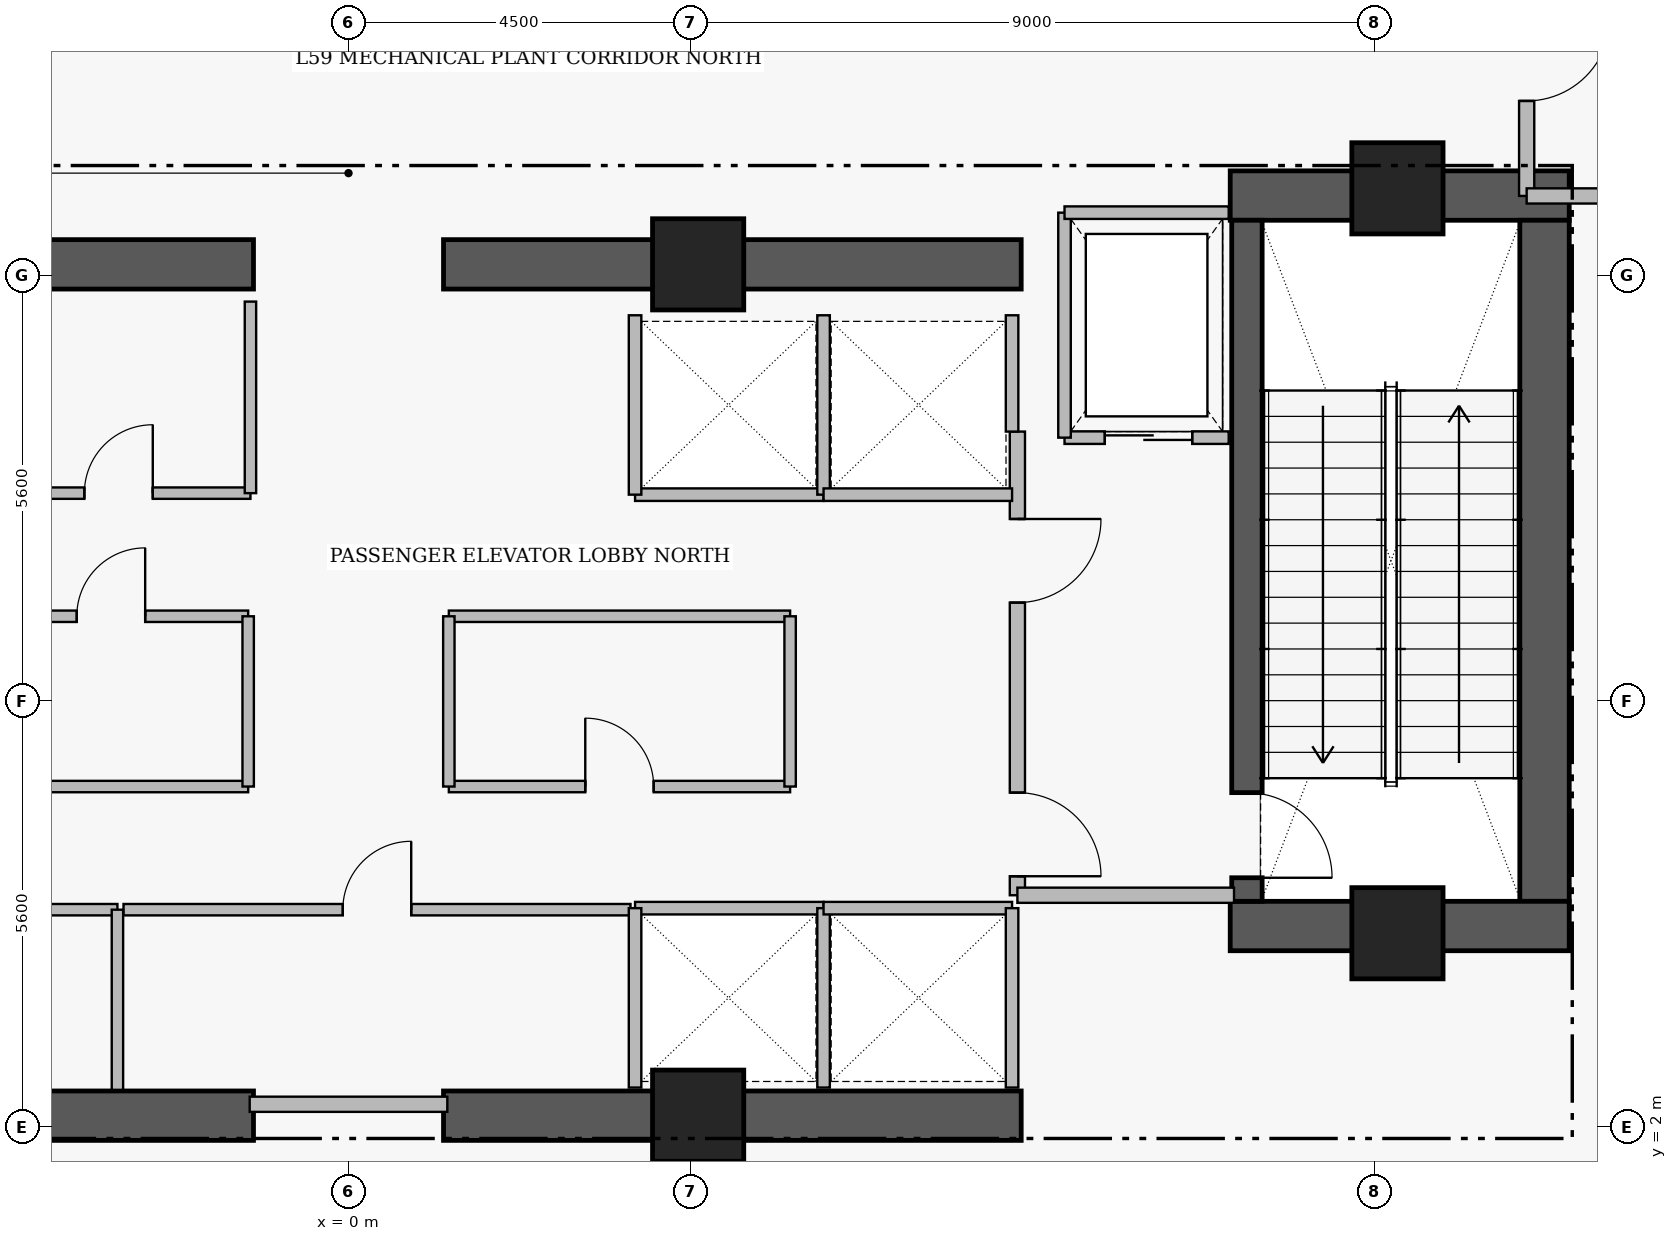
"""IFC4 building model, lengths in metres.
Left out: names, types, materials, properties, quantities, classifications, styles, units other than length and angle.
Written with IfcOpenShell. Run it as: python <this file> out.ifc"""

import sys

from ifc_helpers import new_model, si_unit, direction, frame, frame_2d, origin, origin_2d, place, context, subcontext, project, spatial, rectangle, extrude, element, fill, save


model = new_model("IFC4")
c1 = context("Model", 3, precision=1e-05, world=origin(), true_north=direction((0.0, 1.0)))
c2 = subcontext(c1, "Body", "Model", "MODEL_VIEW")
j1 = project(units=[si_unit("LENGTHUNIT", "METRE"), si_unit("PLANEANGLEUNIT", "RADIAN")], contexts=[c1])
p1 = place(None, origin())
s1 = spatial("IfcSite", under=j1, at=p1, CompositionType="ELEMENT")
p2 = place(p1, origin())
s2 = spatial("IfcBuilding", under=s1, at=p2, CompositionType="ELEMENT")
p3 = place(p2, frame((0.0, 0.0, 233.65)))
s3 = spatial("IfcBuildingStorey", under=s2, at=p3, CompositionType="ELEMENT", Elevation=233.65)
p4 = place(p3, frame((11.6, 14.255, 0.0), z_axis=(0.0, 0.0, 1.0), x_axis=(1.0, 0.0, 0.0)))
e1 = element("IfcWall", 1, at=p4, inside=s3, PredefinedType="SHEAR", context=c2, shape_type="SweptSolid", body=[
    extrude(rectangle(XDim=4.46, YDim=0.65, at=frame_2d((2.23, 0.0))), origin(), (0.0, 0.0, 1.0), 5.81),
])
p5 = place(p3, frame((15.735, 4.97, 0.0), z_axis=(0.0, 0.0, 1.0), x_axis=(0.0, 1.0, 0.0)))
e2 = element("IfcWall", 2, at=p5, inside=s3, PredefinedType="SHEAR", context=c2, shape_type="SweptSolid", body=[
    extrude(rectangle(XDim=8.96, YDim=0.65, at=frame_2d((4.48, 0.0))), origin(), (0.0, 0.0, 1.0), 5.81),
])
p6 = place(p3, frame((11.6, 4.645, 0.0), z_axis=(0.0, 0.0, 1.0), x_axis=(1.0, 0.0, 0.0)))
e3 = element("IfcWall", 3, at=p6, inside=s3, PredefinedType="SHEAR", context=c2, shape_type="SweptSolid", body=[
    extrude(rectangle(XDim=4.46, YDim=0.65, at=frame_2d((2.23, 0.0))), origin(), (0.0, 0.0, 1.0), 5.81),
])
for number, where, z_axis, x_axis in (
    (4, (-8.85, 2.15, 0.0), (0.0, 0.0, 1.0), (1.0, 0.0, 0.0)),
    (5, (1.25, 2.15, 0.0), (0.0, 0.0, 1.0), (1.0, 0.0, 0.0)),
    (6, (-8.85, 13.35, 0.0), (0.0, 0.0, 1.0), (1.0, 0.0, 0.0)),
    (7, (1.25, 13.35, 0.0), (0.0, 0.0, 1.0), (1.0, 0.0, 0.0)),
):
    element("IfcWall", number, at=place(p3, frame(where, z_axis=z_axis, x_axis=x_axis)), inside=s3, PredefinedType="SHEAR", context=c2, shape_type="SweptSolid", body=[
        extrude(rectangle(XDim=7.6, YDim=0.65, at=frame_2d((3.8, 0.0))), origin(), (0.0, 0.0, 1.0), 5.74),
    ])
p7 = place(p3, frame((11.82, 13.93, 0.0), z_axis=(0.0, 0.0, 1.0), x_axis=(0.0, -1.0, 0.0)))
e8 = element("IfcWall", 8, at=p7, inside=s3, PredefinedType="SHEAR", context=c2, shape_type="SweptSolid", body=[
    extrude(rectangle(XDim=8.96, YDim=0.4, at=frame_2d((4.48, 0.0))), origin(), (0.0, 0.0, 1.0), 5.81),
])
p8 = place(p7, frame((7.53, 0.0, 0.0)))
e9 = element("IfcOpeningElement", 9, at=p8, cuts=e8, PredefinedType="OPENING", context=c2, shape_type="SweptSolid", body=[
    extrude(rectangle(XDim=1.12, YDim=2.22, at=frame_2d((0.56, 1.11))), frame((0.0, 0.21, 0.0), z_axis=(0.0, -1.0, 0.0), x_axis=(1.0, 0.0, 0.0)), (0.0, 0.0, 1.0), 0.42),
])
for number, where, z_axis, x_axis in (
    (10, (4.6, 13.35, 0.0), (0.0, 0.0, 1.0), (1.0, 0.0, 0.0)),
    (11, (13.8, 14.35, 0.0), (0.0, 0.0, 1.0), (1.0, 0.0, 0.0)),
    (12, (4.6, 2.15, 0.0), (0.0, 0.0, 1.0), (1.0, 0.0, 0.0)),
    (13, (13.8, 4.55, 0.0), (0.0, 0.0, 1.0), (1.0, 0.0, 0.0)),
):
    element("IfcColumn", number, at=place(p3, frame(where, z_axis=z_axis, x_axis=x_axis)), inside=s3, PredefinedType="COLUMN", context=c2, shape_type="SweptSolid", body=[
        extrude(rectangle(XDim=1.2, YDim=1.2, at=origin_2d()), origin(), (0.0, 0.0, 1.0), 6.0),
    ])
p9 = place(p3, frame((8.8, 11.15, 0.0), z_axis=(0.0, 0.0, 1.0), x_axis=(0.0, -1.0, 0.0)))
e14 = element("IfcWall", 14, at=p9, inside=s3, PredefinedType="PARTITIONING", context=c2, shape_type="SweptSolid", body=[
    extrude(rectangle(XDim=6.1, YDim=0.2, at=frame_2d((3.05, 0.0))), origin(), (0.0, 0.0, 1.0), 5.74),
])
p10 = place(p9, frame((1.15, 0.0, 0.0)))
e15 = element("IfcOpeningElement", 15, at=p10, cuts=e14, PredefinedType="OPENING", context=c2, shape_type="SweptSolid", body=[
    extrude(rectangle(XDim=1.1, YDim=2.2, at=frame_2d((0.55, 1.1))), frame((0.0, 0.11, 0.0), z_axis=(0.0, -1.0, 0.0), x_axis=(1.0, 0.0, 0.0)), (0.0, 0.0, 1.0), 0.22),
])
p11 = place(p9, frame((4.75, 0.0, 0.0)))
e16 = element("IfcOpeningElement", 16, at=p11, cuts=e14, PredefinedType="OPENING", context=c2, shape_type="SweptSolid", body=[
    extrude(rectangle(XDim=1.1, YDim=2.2, at=frame_2d((0.55, 1.1))), frame((0.0, 0.11, 0.0), z_axis=(0.0, -1.0, 0.0), x_axis=(1.0, 0.0, 0.0)), (0.0, 0.0, 1.0), 0.22),
])
p12 = place(p3, frame((9.42, 11.07, 0.0), z_axis=(0.0, 0.0, 1.0), x_axis=(1.0, 0.0, 0.0)))
e17 = element("IfcWall", 17, at=p12, inside=s3, PredefinedType="PARTITIONING", context=c2, shape_type="SweptSolid", body=[
    extrude(rectangle(XDim=2.16, YDim=0.165, at=frame_2d((1.08, 0.0))), origin(), (0.0, 0.0, 1.0), 5.74),
])
p13 = place(p12, frame((0.53, 0.0, 0.0)))
e18 = element("IfcOpeningElement", 18, at=p13, cuts=e17, PredefinedType="OPENING", context=c2, shape_type="SweptSolid", body=[
    extrude(rectangle(XDim=1.15, YDim=2.25, at=frame_2d((0.575, 1.125))), frame((0.0, 0.093, 0.0), z_axis=(0.0, -1.0, 0.0), x_axis=(1.0, 0.0, 0.0)), (0.0, 0.0, 1.0), 0.185),
])
p14 = place(p3, frame((-8.71, 4.86, 0.0), z_axis=(0.0, 0.0, 1.0), x_axis=(1.0, 0.0, 0.0)))
e19 = element("IfcWall", 19, at=p14, inside=s3, PredefinedType="PARTITIONING", context=c2, shape_type="SweptSolid", body=[
    extrude(rectangle(XDim=5.67, YDim=0.15, at=frame_2d((2.835, 0.0))), origin(), (0.0, 0.0, 1.0), 5.74),
])
p15 = place(p14, frame((2.385, 0.0, 0.0)))
e20 = element("IfcOpeningElement", 20, at=p15, cuts=e19, PredefinedType="OPENING", context=c2, shape_type="SweptSolid", body=[
    extrude(rectangle(XDim=0.9, YDim=2.15, at=frame_2d((0.45, 1.075))), frame((0.0, 0.085, 0.0), z_axis=(0.0, -1.0, 0.0), x_axis=(1.0, 0.0, 0.0)), (0.0, 0.0, 1.0), 0.17),
])
p16 = place(p3, frame((-2.96, 4.86, 0.0), z_axis=(0.0, 0.0, 1.0), x_axis=(1.0, 0.0, 0.0)))
e21 = element("IfcWall", 21, at=p16, inside=s3, PredefinedType="PARTITIONING", context=c2, shape_type="SweptSolid", body=[
    extrude(rectangle(XDim=6.67, YDim=0.15, at=frame_2d((3.335, 0.0))), origin(), (0.0, 0.0, 1.0), 5.74),
])
p17 = place(p16, frame((2.885, 0.0, 0.0)))
e22 = element("IfcOpeningElement", 22, at=p17, cuts=e21, PredefinedType="OPENING", context=c2, shape_type="SweptSolid", body=[
    extrude(rectangle(XDim=0.9, YDim=2.15, at=frame_2d((0.45, 1.075))), frame((0.0, 0.085, 0.0), z_axis=(0.0, -1.0, 0.0), x_axis=(1.0, 0.0, 0.0)), (0.0, 0.0, 1.0), 0.17),
])
p18 = place(p3, frame((-4.76, 10.34, 0.0), z_axis=(0.0, 0.0, 1.0), x_axis=(1.0, 0.0, 0.0)))
e23 = element("IfcWall", 23, at=p18, inside=s3, PredefinedType="PARTITIONING", context=c2, shape_type="SweptSolid", body=[
    extrude(rectangle(XDim=3.47, YDim=0.15, at=frame_2d((1.735, 0.0))), origin(), (0.0, 0.0, 1.0), 5.74),
])
p19 = place(p18, frame((1.285, 0.0, 0.0)))
e24 = element("IfcOpeningElement", 24, at=p19, cuts=e23, PredefinedType="OPENING", context=c2, shape_type="SweptSolid", body=[
    extrude(rectangle(XDim=0.9, YDim=2.15, at=frame_2d((0.45, 1.075))), frame((0.0, 0.085, 0.0), z_axis=(0.0, -1.0, 0.0), x_axis=(1.0, 0.0, 0.0)), (0.0, 0.0, 1.0), 0.17),
])
p20 = place(p3, frame((-4.93, 8.72, 0.0), z_axis=(0.0, 0.0, 1.0), x_axis=(1.0, 0.0, 0.0)))
e25 = element("IfcWall", 25, at=p20, inside=s3, PredefinedType="PARTITIONING", context=c2, shape_type="SweptSolid", body=[
    extrude(rectangle(XDim=3.61, YDim=0.15, at=frame_2d((1.805, 0.0))), origin(), (0.0, 0.0, 1.0), 5.74),
])
p21 = place(p20, frame((1.355, 0.0, 0.0)))
e26 = element("IfcOpeningElement", 26, at=p21, cuts=e25, PredefinedType="OPENING", context=c2, shape_type="SweptSolid", body=[
    extrude(rectangle(XDim=0.9, YDim=2.15, at=frame_2d((0.45, 1.075))), frame((0.0, 0.085, 0.0), z_axis=(0.0, -1.0, 0.0), x_axis=(1.0, 0.0, 0.0)), (0.0, 0.0, 1.0), 0.17),
])
p22 = place(p3, frame((1.32, 6.48, 0.0), z_axis=(0.0, 0.0, 1.0), x_axis=(1.0, 0.0, 0.0)))
e27 = element("IfcWall", 27, at=p22, inside=s3, PredefinedType="PARTITIONING", context=c2, shape_type="SweptSolid", body=[
    extrude(rectangle(XDim=4.49, YDim=0.15, at=frame_2d((2.245, 0.0))), origin(), (0.0, 0.0, 1.0), 5.74),
])
p23 = place(p22, frame((1.795, 0.0, 0.0)))
e28 = element("IfcOpeningElement", 28, at=p23, cuts=e27, PredefinedType="OPENING", context=c2, shape_type="SweptSolid", body=[
    extrude(rectangle(XDim=0.9, YDim=2.15, at=frame_2d((0.45, 1.075))), frame((0.0, 0.085, 0.0), z_axis=(0.0, -1.0, 0.0), x_axis=(1.0, 0.0, 0.0)), (0.0, 0.0, 1.0), 0.17),
])
p24 = place(p3, frame((15.5, 19.3, 0.0), z_axis=(0.0, 0.0, 1.0), x_axis=(0.0, -1.0, 0.0)))
e29 = element("IfcWall", 29, at=p24, inside=s3, PredefinedType="PARTITIONING", context=c2, shape_type="SweptSolid", body=[
    extrude(rectangle(XDim=5.05, YDim=0.2, at=frame_2d((2.525, 0.0))), origin(), (0.0, 0.0, 1.0), 5.74),
])
p25 = place(p24, frame((2.7, 0.0, 0.0)))
e30 = element("IfcOpeningElement", 30, at=p25, cuts=e29, PredefinedType="OPENING", context=c2, shape_type="SweptSolid", body=[
    extrude(rectangle(XDim=1.1, YDim=2.2, at=frame_2d((0.55, 1.1))), frame((0.0, 0.11, 0.0), z_axis=(0.0, -1.0, 0.0), x_axis=(1.0, 0.0, 0.0)), (0.0, 0.0, 1.0), 0.22),
])
p26 = place(p3, frame((8.8, 5.05, 0.0), z_axis=(0.0, 0.0, 1.0), x_axis=(1.0, 0.0, 0.0)))
e31 = element("IfcWall", 31, at=p26, inside=s3, PredefinedType="PARTITIONING", context=c2, shape_type="SweptSolid", body=[
    extrude(rectangle(XDim=2.85, YDim=0.2, at=frame_2d((1.425, 0.0))), origin(), (0.0, 0.0, 1.0), 5.74),
])
p27 = place(p3, frame((9.42, 11.07, 0.0), z_axis=(0.0, 0.0, 1.0), x_axis=(0.0, 1.0, 0.0)))
e32 = element("IfcWall", 32, at=p27, inside=s3, PredefinedType="PARTITIONING", context=c2, shape_type="SweptSolid", body=[
    extrude(rectangle(XDim=2.96, YDim=0.165, at=frame_2d((1.48, 0.0))), origin(), (0.0, 0.0, 1.0), 5.74),
])
p28 = place(p3, frame((9.42, 14.03, 0.0), z_axis=(0.0, 0.0, 1.0), x_axis=(1.0, 0.0, 0.0)))
e33 = element("IfcWall", 33, at=p28, inside=s3, PredefinedType="PARTITIONING", context=c2, shape_type="SweptSolid", body=[
    extrude(rectangle(XDim=2.16, YDim=0.165, at=frame_2d((1.08, 0.0))), origin(), (0.0, 0.0, 1.0), 5.74),
])
p29 = place(p3, frame((3.77, 4.88, 0.0), z_axis=(0.0, 0.0, 1.0), x_axis=(1.0, 0.0, 0.0)))
e34 = element("IfcWall", 34, at=p29, inside=s3, PredefinedType="PARTITIONING", context=c2, shape_type="SweptSolid", body=[
    extrude(rectangle(XDim=2.48, YDim=0.165, at=frame_2d((1.24, 0.0))), origin(), (0.0, 0.0, 1.0), 5.74),
])
for number, where, z_axis, x_axis in (
    (35, (3.77, 2.52, 0.0), (0.0, 0.0, 1.0), (0.0, 1.0, 0.0)),
    (36, (6.25, 2.52, 0.0), (0.0, 0.0, 1.0), (0.0, 1.0, 0.0)),
):
    element("IfcWall", number, at=place(p3, frame(where, z_axis=z_axis, x_axis=x_axis)), inside=s3, PredefinedType="PARTITIONING", context=c2, shape_type="SweptSolid", body=[
        extrude(rectangle(XDim=2.36, YDim=0.165, at=frame_2d((1.18, 0.0))), origin(), (0.0, 0.0, 1.0), 5.74),
    ])
p30 = place(p3, frame((6.25, 4.88, 0.0), z_axis=(0.0, 0.0, 1.0), x_axis=(1.0, 0.0, 0.0)))
e37 = element("IfcWall", 37, at=p30, inside=s3, PredefinedType="PARTITIONING", context=c2, shape_type="SweptSolid", body=[
    extrude(rectangle(XDim=2.48, YDim=0.165, at=frame_2d((1.24, 0.0))), origin(), (0.0, 0.0, 1.0), 5.74),
])
p31 = place(p3, frame((8.73, 2.52, 0.0), z_axis=(0.0, 0.0, 1.0), x_axis=(0.0, 1.0, 0.0)))
e38 = element("IfcWall", 38, at=p31, inside=s3, PredefinedType="PARTITIONING", context=c2, shape_type="SweptSolid", body=[
    extrude(rectangle(XDim=2.36, YDim=0.165, at=frame_2d((1.18, 0.0))), origin(), (0.0, 0.0, 1.0), 5.74),
])
p32 = place(p3, frame((3.77, 10.32, 0.0), z_axis=(0.0, 0.0, 1.0), x_axis=(1.0, 0.0, 0.0)))
e39 = element("IfcWall", 39, at=p32, inside=s3, PredefinedType="PARTITIONING", context=c2, shape_type="SweptSolid", body=[
    extrude(rectangle(XDim=2.48, YDim=0.165, at=frame_2d((1.24, 0.0))), origin(), (0.0, 0.0, 1.0), 5.74),
])
for number, where, z_axis, x_axis in (
    (40, (3.77, 10.32, 0.0), (0.0, 0.0, 1.0), (0.0, 1.0, 0.0)),
    (41, (6.25, 10.32, 0.0), (0.0, 0.0, 1.0), (0.0, 1.0, 0.0)),
):
    element("IfcWall", number, at=place(p3, frame(where, z_axis=z_axis, x_axis=x_axis)), inside=s3, PredefinedType="PARTITIONING", context=c2, shape_type="SweptSolid", body=[
        extrude(rectangle(XDim=2.36, YDim=0.165, at=frame_2d((1.18, 0.0))), origin(), (0.0, 0.0, 1.0), 5.74),
    ])
p33 = place(p3, frame((6.25, 10.32, 0.0), z_axis=(0.0, 0.0, 1.0), x_axis=(1.0, 0.0, 0.0)))
e42 = element("IfcWall", 42, at=p33, inside=s3, PredefinedType="PARTITIONING", context=c2, shape_type="SweptSolid", body=[
    extrude(rectangle(XDim=2.48, YDim=0.165, at=frame_2d((1.24, 0.0))), origin(), (0.0, 0.0, 1.0), 5.74),
])
p34 = place(p3, frame((8.73, 11.15, 0.0), z_axis=(0.0, 0.0, 1.0), x_axis=(0.0, 1.0, 0.0)))
e43 = element("IfcWall", 43, at=p34, inside=s3, PredefinedType="PARTITIONING", context=c2, shape_type="SweptSolid", body=[
    extrude(rectangle(XDim=1.53, YDim=0.165, at=frame_2d((0.765, 0.0))), origin(), (0.0, 0.0, 1.0), 5.74),
])
p35 = place(p3, frame((-1.3, 2.3, 0.0), z_axis=(0.0, 0.0, 1.0), x_axis=(1.0, 0.0, 0.0)))
e44 = element("IfcWall", 44, at=p35, inside=s3, PredefinedType="PARTITIONING", context=c2, shape_type="SweptSolid", body=[
    extrude(rectangle(XDim=2.6, YDim=0.2, at=frame_2d((1.3, 0.0))), origin(), (0.0, 0.0, 1.0), 4.64),
])
p36 = place(p3, frame((-3.04, 2.49, 0.0), z_axis=(0.0, 0.0, 1.0), x_axis=(0.0, 1.0, 0.0)))
e45 = element("IfcWall", 45, at=p36, inside=s3, PredefinedType="PARTITIONING", context=c2, shape_type="SweptSolid", body=[
    extrude(rectangle(XDim=2.37, YDim=0.15, at=frame_2d((1.185, 0.0))), origin(), (0.0, 0.0, 1.0), 5.74),
])
p37 = place(p3, frame((-1.29, 10.34, 0.0), z_axis=(0.0, 0.0, 1.0), x_axis=(0.0, 1.0, 0.0)))
e46 = element("IfcWall", 46, at=p37, inside=s3, PredefinedType="PARTITIONING", context=c2, shape_type="SweptSolid", body=[
    extrude(rectangle(XDim=2.52, YDim=0.15, at=frame_2d((1.26, 0.0))), origin(), (0.0, 0.0, 1.0), 5.74),
])
p38 = place(p3, frame((-4.93, 6.48, 0.0), z_axis=(0.0, 0.0, 1.0), x_axis=(1.0, 0.0, 0.0)))
e47 = element("IfcWall", 47, at=p38, inside=s3, PredefinedType="PARTITIONING", context=c2, shape_type="SweptSolid", body=[
    extrude(rectangle(XDim=3.61, YDim=0.15, at=frame_2d((1.805, 0.0))), origin(), (0.0, 0.0, 1.0), 5.74),
])
p39 = place(p3, frame((-1.32, 6.48, 0.0), z_axis=(0.0, 0.0, 1.0), x_axis=(0.0, 1.0, 0.0)))
e48 = element("IfcWall", 48, at=p39, inside=s3, PredefinedType="PARTITIONING", context=c2, shape_type="SweptSolid", body=[
    extrude(rectangle(XDim=2.24, YDim=0.15, at=frame_2d((1.12, 0.0))), origin(), (0.0, 0.0, 1.0), 5.74),
])
p40 = place(p3, frame((1.32, 8.72, 0.0), z_axis=(0.0, 0.0, 1.0), x_axis=(1.0, 0.0, 0.0)))
e49 = element("IfcWall", 49, at=p40, inside=s3, PredefinedType="PARTITIONING", context=c2, shape_type="SweptSolid", body=[
    extrude(rectangle(XDim=4.49, YDim=0.15, at=frame_2d((2.245, 0.0))), origin(), (0.0, 0.0, 1.0), 5.74),
])
for number, where, z_axis, x_axis in (
    (50, (1.32, 6.48, 0.0), (0.0, 0.0, 1.0), (0.0, 1.0, 0.0)),
    (51, (5.81, 6.48, 0.0), (0.0, 0.0, 1.0), (0.0, 1.0, 0.0)),
):
    element("IfcWall", number, at=place(p3, frame(where, z_axis=z_axis, x_axis=x_axis)), inside=s3, PredefinedType="PARTITIONING", context=c2, shape_type="SweptSolid", body=[
        extrude(rectangle(XDim=2.24, YDim=0.15, at=frame_2d((1.12, 0.0))), origin(), (0.0, 0.0, 1.0), 5.74),
    ])
p41 = place(p3, frame((15.5, 14.25, 0.0), z_axis=(0.0, 0.0, 1.0), x_axis=(1.0, 0.0, 0.0)))
e52 = element("IfcWall", 52, at=p41, inside=s3, PredefinedType="PARTITIONING", context=c2, shape_type="SweptSolid", body=[
    extrude(rectangle(XDim=5.0, YDim=0.2, at=frame_2d((2.5, 0.0))), origin(), (0.0, 0.0, 1.0), 4.622),
])
p42 = place(p8, origin())
e53 = element("IfcDoor", 53, at=p42, inside=s3, OperationType="SINGLE_SWING_RIGHT", PredefinedType="DOOR", context=c2, shape_type="SweptSolid", body=[
    extrude(rectangle(XDim=1.12, YDim=2.22, at=frame_2d((0.56, 1.11))), frame((0.0, 0.025, 0.0), z_axis=(0.0, -1.0, 0.0), x_axis=(1.0, 0.0, 0.0)), (0.0, 0.0, 1.0), 0.05),
])
fill(e9, e53)
p43 = place(p10, origin())
e54 = element("IfcDoor", 54, at=p43, inside=s3, OperationType="SINGLE_SWING_LEFT", PredefinedType="DOOR", context=c2, shape_type="SweptSolid", body=[
    extrude(rectangle(XDim=1.1, YDim=2.2, at=frame_2d((0.55, 1.1))), frame((0.0, 0.025, 0.0), z_axis=(0.0, -1.0, 0.0), x_axis=(1.0, 0.0, 0.0)), (0.0, 0.0, 1.0), 0.05),
])
fill(e15, e54)
p44 = place(p11, origin())
e55 = element("IfcDoor", 55, at=p44, inside=s3, OperationType="SINGLE_SWING_RIGHT", PredefinedType="DOOR", context=c2, shape_type="SweptSolid", body=[
    extrude(rectangle(XDim=1.1, YDim=2.2, at=frame_2d((0.55, 1.1))), frame((0.0, 0.025, 0.0), z_axis=(0.0, -1.0, 0.0), x_axis=(1.0, 0.0, 0.0)), (0.0, 0.0, 1.0), 0.05),
])
fill(e16, e55)
p45 = place(p13, origin())
e56 = element("IfcDoor", 56, at=p45, inside=s3, OperationType="SLIDING_TO_LEFT", PredefinedType="DOOR", context=c2, shape_type="SweptSolid", body=[
    extrude(rectangle(XDim=1.15, YDim=2.25, at=frame_2d((0.575, 1.125))), frame((0.0, 0.025, 0.0), z_axis=(0.0, -1.0, 0.0), x_axis=(1.0, 0.0, 0.0)), (0.0, 0.0, 1.0), 0.05),
])
fill(e18, e56)
p46 = place(p17, origin())
e57 = element("IfcDoor", 57, at=p46, inside=s3, OperationType="SINGLE_SWING_RIGHT", PredefinedType="DOOR", context=c2, shape_type="SweptSolid", body=[
    extrude(rectangle(XDim=0.9, YDim=2.15, at=frame_2d((0.45, 1.075))), frame((0.0, 0.025, 0.0), z_axis=(0.0, -1.0, 0.0), x_axis=(1.0, 0.0, 0.0)), (0.0, 0.0, 1.0), 0.05),
])
fill(e22, e57)
p47 = place(p19, origin())
e58 = element("IfcDoor", 58, at=p47, inside=s3, OperationType="SINGLE_SWING_RIGHT", PredefinedType="DOOR", context=c2, shape_type="SweptSolid", body=[
    extrude(rectangle(XDim=0.9, YDim=2.15, at=frame_2d((0.45, 1.075))), frame((0.0, 0.025, 0.0), z_axis=(0.0, -1.0, 0.0), x_axis=(1.0, 0.0, 0.0)), (0.0, 0.0, 1.0), 0.05),
])
fill(e24, e58)
p48 = place(p21, origin())
e59 = element("IfcDoor", 59, at=p48, inside=s3, OperationType="SINGLE_SWING_RIGHT", PredefinedType="DOOR", context=c2, shape_type="SweptSolid", body=[
    extrude(rectangle(XDim=0.9, YDim=2.15, at=frame_2d((0.45, 1.075))), frame((0.0, 0.025, 0.0), z_axis=(0.0, -1.0, 0.0), x_axis=(1.0, 0.0, 0.0)), (0.0, 0.0, 1.0), 0.05),
])
fill(e26, e59)
p49 = place(p23, origin())
e60 = element("IfcDoor", 60, at=p49, inside=s3, OperationType="SINGLE_SWING_LEFT", PredefinedType="DOOR", context=c2, shape_type="SweptSolid", body=[
    extrude(rectangle(XDim=0.9, YDim=2.15, at=frame_2d((0.45, 1.075))), frame((0.0, 0.025, 0.0), z_axis=(0.0, -1.0, 0.0), x_axis=(1.0, 0.0, 0.0)), (0.0, 0.0, 1.0), 0.05),
])
fill(e28, e60)
p50 = place(p25, origin())
e61 = element("IfcDoor", 61, at=p50, inside=s3, OperationType="SINGLE_SWING_LEFT", PredefinedType="DOOR", context=c2, shape_type="SweptSolid", body=[
    extrude(rectangle(XDim=1.1, YDim=2.2, at=frame_2d((0.55, 1.1))), frame((0.0, 0.025, 0.0), z_axis=(0.0, -1.0, 0.0), x_axis=(1.0, 0.0, 0.0)), (0.0, 0.0, 1.0), 0.05),
])
fill(e30, e61)
save(model, sys.argv[1])
